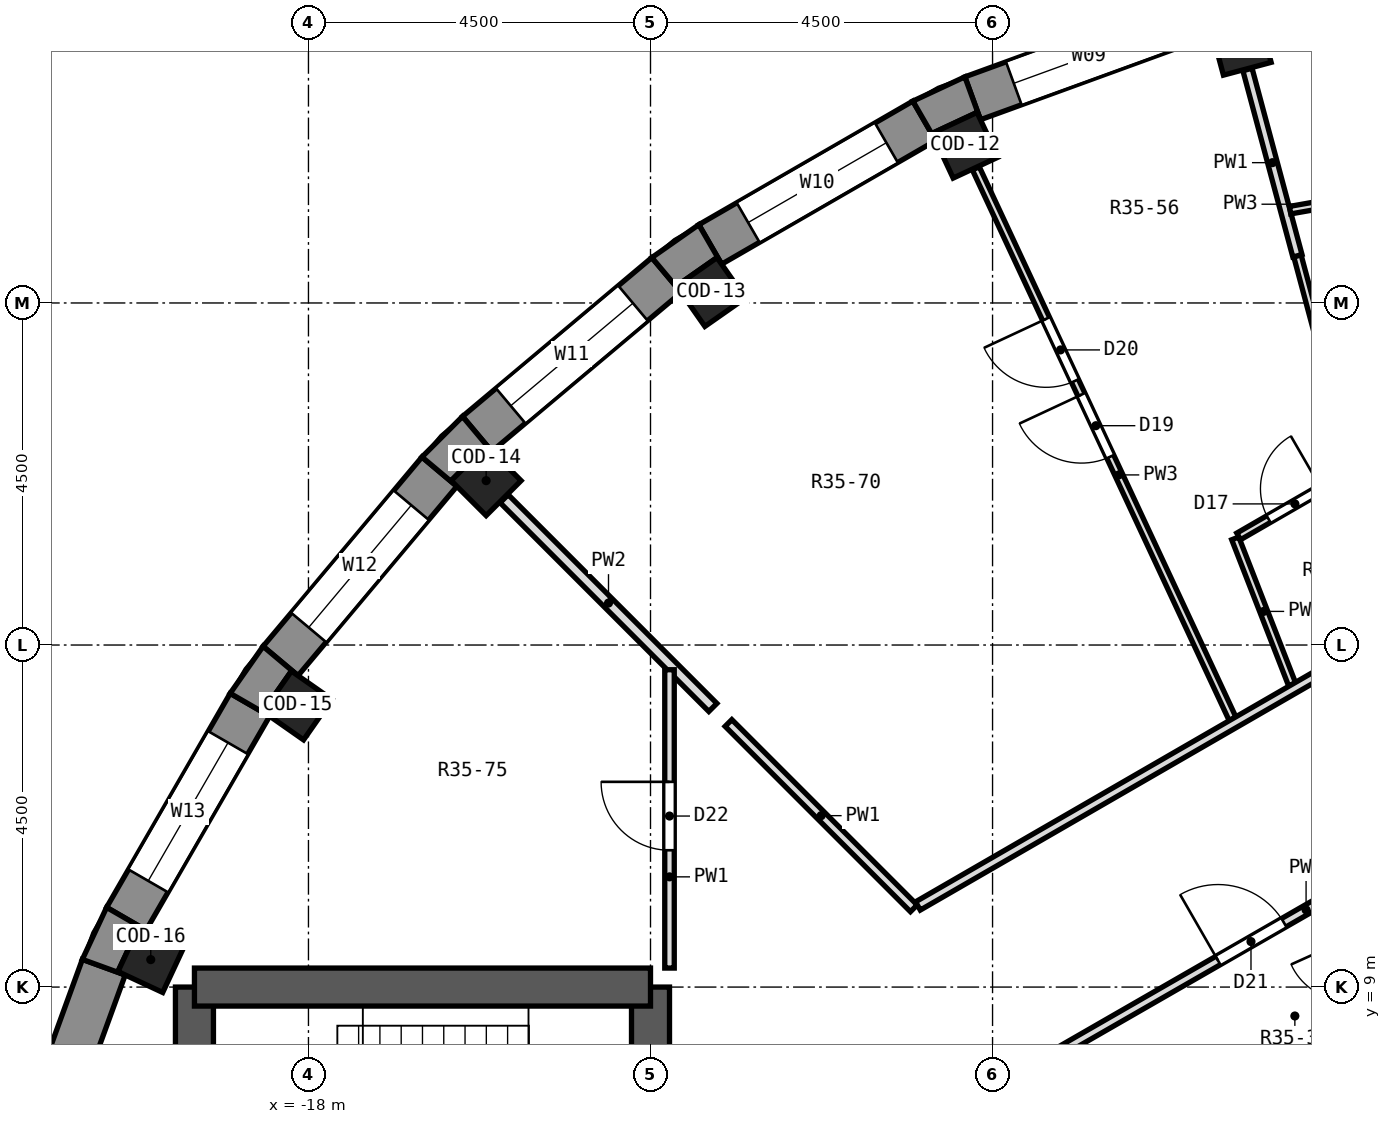
"""IFC4 building model, lengths in metres.
Left out: names, types, materials, properties, quantities, classifications, styles, units other than length and angle.
Written with IfcOpenShell. Run it as: python <this file> out.ifc"""

import sys

from ifc_helpers import new_model, si_unit, direction, frame, frame_2d, origin, origin_2d, place, context, subcontext, project, spatial, polyline, rectangle, outline, extrude, element, fill, save


model = new_model("IFC4")
c1 = context("Model", 3, precision=1e-05, world=origin(), true_north=direction((0.0, 1.0)))
c2 = subcontext(c1, "Body", "Model", "MODEL_VIEW")
j1 = project(units=[si_unit("LENGTHUNIT", "METRE"), si_unit("PLANEANGLEUNIT", "RADIAN")], contexts=[c1])
p1 = place(None, origin())
s1 = spatial("IfcSite", under=j1, at=p1, CompositionType="ELEMENT")
p2 = place(p1, origin())
s2 = spatial("IfcBuilding", under=s1, at=p2, CompositionType="ELEMENT")
p3 = place(p2, frame((0.0, 0.0, 249.5)))
s3 = spatial("IfcBuildingStorey", under=s2, at=p3, CompositionType="ELEMENT", Elevation=249.5)
for number, where, z_axis, x_axis in (
    (1, (-5.733, 21.395, 0.0), (0.0, 0.0, 1.0), (-0.259, 0.966, 0.0)),
    (2, (-9.361, 20.075, 0.0), (0.0, 0.0, 1.0), (-0.423, 0.906, 0.0)),
    (3, (-12.705, 18.144, 0.0), (0.0, 0.0, 1.0), (-0.574, 0.819, 0.0)),
    (4, (-15.662, 15.662, 0.0), (0.0, 0.0, 1.0), (-0.707, 0.707, 0.0)),
    (5, (-18.144, 12.705, 0.0), (0.0, 0.0, 1.0), (-0.819, 0.574, 0.0)),
    (6, (-20.075, 9.361, 0.0), (0.0, 0.0, 1.0), (-0.906, 0.423, 0.0)),
):
    element("IfcColumn", number, at=place(p3, frame(where, z_axis=z_axis, x_axis=x_axis)), inside=s3, PredefinedType="COLUMN", context=c2, shape_type="SweptSolid", body=[
        extrude(rectangle(XDim=0.65, YDim=0.65, at=origin_2d()), origin(), (0.0, 0.0, 1.0), 3.3),
    ])
p4 = place(p3, frame((-13.5, -9.0, 0.0), z_axis=(0.0, 0.0, 1.0), x_axis=(0.0, 1.0, 0.0)))
e7 = element("IfcWall", 7, at=p4, inside=s3, PredefinedType="SHEAR", context=c2, shape_type="SweptSolid", body=[
    extrude(rectangle(XDim=18.0, YDim=0.5, at=frame_2d((9.0, 0.0))), origin(), (0.0, 0.0, 1.0), 3.3),
])
p5 = place(p4, frame((15.4, 0.0, 0.0)))
e8 = element("IfcOpeningElement", 8, at=p5, cuts=e7, PredefinedType="OPENING", context=c2, shape_type="SweptSolid", body=[
    extrude(rectangle(XDim=1.2, YDim=2.1, at=frame_2d((0.6, 1.05))), frame((0.0, 0.262, 0.0), z_axis=(0.0, -1.0, 0.0), x_axis=(1.0, 0.0, 0.0)), (0.0, 0.0, 1.0), 0.524),
])
p6 = place(p4, frame((1.4, 0.0, 0.0)))
e9 = element("IfcOpeningElement", 9, at=p6, cuts=e7, PredefinedType="OPENING", context=c2, shape_type="SweptSolid", body=[
    extrude(rectangle(XDim=1.2, YDim=2.1, at=frame_2d((0.6, 1.05))), frame((0.0, 0.262, 0.0), z_axis=(0.0, -1.0, 0.0), x_axis=(1.0, 0.0, 0.0)), (0.0, 0.0, 1.0), 0.524),
])
p7 = place(p4, frame((7.5, 0.0, 0.0)))
e10 = element("IfcOpeningElement", 10, at=p7, cuts=e7, PredefinedType="OPENING", context=c2, shape_type="SweptSolid", body=[
    extrude(rectangle(XDim=3.0, YDim=2.4, at=frame_2d((1.5, 1.2))), frame((0.0, 0.262, 0.0), z_axis=(0.0, -1.0, 0.0), x_axis=(1.0, 0.0, 0.0)), (0.0, 0.0, 1.0), 0.524),
])
p8 = place(p3, frame((-19.5, -9.0, 0.0), z_axis=(0.0, 0.0, 1.0), x_axis=(0.0, 1.0, 0.0)))
e11 = element("IfcWall", 11, at=p8, inside=s3, PredefinedType="SHEAR", context=c2, shape_type="SweptSolid", body=[
    extrude(rectangle(XDim=18.0, YDim=0.5, at=frame_2d((9.0, 0.0))), origin(), (0.0, 0.0, 1.0), 3.3),
])
p9 = place(p8, frame((9.45, 0.0, 0.0)))
e12 = element("IfcOpeningElement", 12, at=p9, cuts=e11, PredefinedType="OPENING", context=c2, shape_type="SweptSolid", body=[
    extrude(rectangle(XDim=0.9, YDim=2.1, at=frame_2d((0.45, 1.05))), frame((0.0, 0.262, 0.0), z_axis=(0.0, -1.0, 0.0), x_axis=(1.0, 0.0, 0.0)), (0.0, 0.0, 1.0), 0.524),
])
p10 = place(p8, frame((7.65, 0.0, 0.0)))
e13 = element("IfcOpeningElement", 13, at=p10, cuts=e11, PredefinedType="OPENING", context=c2, shape_type="SweptSolid", body=[
    extrude(rectangle(XDim=0.9, YDim=2.1, at=frame_2d((0.45, 1.05))), frame((0.0, 0.262, 0.0), z_axis=(0.0, -1.0, 0.0), x_axis=(1.0, 0.0, 0.0)), (0.0, 0.0, 1.0), 0.524),
])
p11 = place(p3, frame((-13.5, 9.0, 0.0), z_axis=(0.0, 0.0, 1.0), x_axis=(-1.0, 0.0, 0.0)))
e14 = element("IfcWall", 14, at=p11, inside=s3, PredefinedType="SHEAR", context=c2, shape_type="SweptSolid", body=[
    extrude(rectangle(XDim=6.0, YDim=0.5, at=frame_2d((3.0, 0.0))), origin(), (0.0, 0.0, 1.0), 3.3),
])
p12 = place(p3, frame((-6.206, 21.805, 0.0), z_axis=(0.0, 0.0, 1.0), x_axis=(-0.939679383794, -0.342056509473, 0.0)))
e15 = element("IfcWall", 15, at=p12, inside=s3, PredefinedType="SOLIDWALL", context=c2, shape_type="SweptSolid", body=[
    extrude(rectangle(XDim=3.252, YDim=0.6, at=frame_2d((1.626, 0.0))), origin(), (0.0, 0.0, 1.0), 2.9),
])
p13 = place(p12, frame((0.576, 0.0, 0.9)))
e16 = element("IfcOpeningElement", 16, at=p13, cuts=e15, PredefinedType="OPENING", context=c2, shape_type="SweptSolid", body=[
    extrude(rectangle(XDim=2.1, YDim=1.8, at=frame_2d((1.05, 0.9))), frame((0.0, 0.312, 0.0), z_axis=(0.0, -1.0, 0.0), x_axis=(1.0, 0.0, 0.0)), (0.0, 0.0, 1.0), 0.624),
])
p14 = place(p3, frame((-9.898, 20.396, 0.0), z_axis=(0.0, 0.0, 1.0), x_axis=(-0.866016800201, -0.500014901547, 0.0)))
e17 = element("IfcWall", 17, at=p14, inside=s3, PredefinedType="SOLIDWALL", context=c2, shape_type="SweptSolid", body=[
    extrude(rectangle(XDim=3.252, YDim=0.6, at=frame_2d((1.626, 0.0))), origin(), (0.0, 0.0, 1.0), 2.9),
])
p15 = place(p14, frame((0.576, 0.0, 0.9)))
e18 = element("IfcOpeningElement", 18, at=p15, cuts=e17, PredefinedType="OPENING", context=c2, shape_type="SweptSolid", body=[
    extrude(rectangle(XDim=2.1, YDim=1.8, at=frame_2d((1.05, 0.9))), frame((0.0, 0.312, 0.0), z_axis=(0.0, -1.0, 0.0), x_axis=(1.0, 0.0, 0.0)), (0.0, 0.0, 1.0), 0.624),
])
p16 = place(p3, frame((-13.29, 18.367, 0.0), z_axis=(0.0, 0.0, 1.0), x_axis=(-0.766056773982, -0.64277291405, 0.0)))
e19 = element("IfcWall", 19, at=p16, inside=s3, PredefinedType="SOLIDWALL", context=c2, shape_type="SweptSolid", body=[
    extrude(rectangle(XDim=3.252, YDim=0.6, at=frame_2d((1.626, 0.0))), origin(), (0.0, 0.0, 1.0), 2.9),
])
p17 = place(p16, frame((0.576, 0.0, 0.9)))
e20 = element("IfcOpeningElement", 20, at=p17, cuts=e19, PredefinedType="OPENING", context=c2, shape_type="SweptSolid", body=[
    extrude(rectangle(XDim=2.1, YDim=1.8, at=frame_2d((1.05, 0.9))), frame((0.0, 0.312, 0.0), z_axis=(0.0, -1.0, 0.0), x_axis=(1.0, 0.0, 0.0)), (0.0, 0.0, 1.0), 0.624),
])
p18 = place(p3, frame((-16.277, 15.781, 0.0), z_axis=(0.0, 0.0, 1.0), x_axis=(-0.64277291405, -0.766056773982, 0.0)))
e21 = element("IfcWall", 21, at=p18, inside=s3, PredefinedType="SOLIDWALL", context=c2, shape_type="SweptSolid", body=[
    extrude(rectangle(XDim=3.252, YDim=0.6, at=frame_2d((1.626, 0.0))), origin(), (0.0, 0.0, 1.0), 2.9),
])
p19 = place(p18, frame((0.576, 0.0, 0.9)))
e22 = element("IfcOpeningElement", 22, at=p19, cuts=e21, PredefinedType="OPENING", context=c2, shape_type="SweptSolid", body=[
    extrude(rectangle(XDim=2.1, YDim=1.8, at=frame_2d((1.05, 0.9))), frame((0.0, 0.312, 0.0), z_axis=(0.0, -1.0, 0.0), x_axis=(1.0, 0.0, 0.0)), (0.0, 0.0, 1.0), 0.624),
])
p20 = place(p3, frame((-18.77, 12.714, 0.0), z_axis=(0.0, 0.0, 1.0), x_axis=(-0.500014901547, -0.866016800201, 0.0)))
e23 = element("IfcWall", 23, at=p20, inside=s3, PredefinedType="SOLIDWALL", context=c2, shape_type="SweptSolid", body=[
    extrude(rectangle(XDim=3.252, YDim=0.6, at=frame_2d((1.626, 0.0))), origin(), (0.0, 0.0, 1.0), 2.9),
])
p21 = place(p20, frame((0.576, 0.0, 0.9)))
e24 = element("IfcOpeningElement", 24, at=p21, cuts=e23, PredefinedType="OPENING", context=c2, shape_type="SweptSolid", body=[
    extrude(rectangle(XDim=2.1, YDim=1.8, at=frame_2d((1.05, 0.9))), frame((0.0, 0.312, 0.0), z_axis=(0.0, -1.0, 0.0), x_axis=(1.0, 0.0, 0.0)), (0.0, 0.0, 1.0), 0.624),
])
p22 = place(p3, frame((-20.693, 9.262, 0.0), z_axis=(0.0, 0.0, 1.0), x_axis=(-0.342056509473, -0.939679383794, 0.0)))
e25 = element("IfcWall", 25, at=p22, inside=s3, PredefinedType="SOLIDWALL", context=c2, shape_type="SweptSolid", body=[
    extrude(rectangle(XDim=3.252, YDim=0.6, at=frame_2d((1.626, 0.0))), origin(), (0.0, 0.0, 1.0), 2.9),
])
p23 = place(p3, origin())
e26 = element("IfcWall", 26, at=p23, inside=s3, PredefinedType="SOLIDWALL", context=c2, shape_type="SweptSolid", body=[
    extrude(outline(polyline([(-9.364, 20.975), (-10.048, 20.656), (-9.748, 20.136), (-9.793, 20.232), (-9.204, 20.507), (-9.159, 20.411), (-9.364, 20.975)])), origin(), (0.0, 0.0, 1.0), 2.9),
])
p24 = place(p3, origin())
e27 = element("IfcWall", 27, at=p24, inside=s3, PredefinedType="SOLIDWALL", context=c2, shape_type="SweptSolid", body=[
    extrude(outline(polyline([(-12.864, 19.03), (-13.482, 18.597), (-13.097, 18.137), (-13.157, 18.224), (-12.625, 18.597), (-12.564, 18.51), (-12.864, 19.03)])), origin(), (0.0, 0.0, 1.0), 2.9),
])
p25 = place(p3, origin())
e28 = element("IfcWall", 28, at=p25, inside=s3, PredefinedType="SOLIDWALL", context=c2, shape_type="SweptSolid", body=[
    extrude(outline(polyline([(-16.507, 15.973), (-16.047, 15.588), (-16.122, 15.662), (-15.662, 16.122), (-15.588, 16.047), (-15.973, 16.507), (-16.507, 15.973)])), origin(), (0.0, 0.0, 1.0), 2.9),
])
p26 = place(p3, origin())
e29 = element("IfcWall", 29, at=p26, inside=s3, PredefinedType="SOLIDWALL", context=c2, shape_type="SweptSolid", body=[
    extrude(outline(polyline([(-19.03, 12.864), (-18.51, 12.564), (-18.597, 12.625), (-18.224, 13.157), (-18.137, 13.097), (-18.597, 13.482), (-19.03, 12.864)])), origin(), (0.0, 0.0, 1.0), 2.9),
])
p27 = place(p3, origin())
e30 = element("IfcWall", 30, at=p27, inside=s3, PredefinedType="SOLIDWALL", context=c2, shape_type="SweptSolid", body=[
    extrude(outline(polyline([(-20.656, 10.048), (-20.975, 9.364), (-20.411, 9.159), (-20.507, 9.204), (-20.232, 9.793), (-20.136, 9.748), (-20.656, 10.048)])), origin(), (0.0, 0.0, 1.0), 2.9),
])
p28 = place(p3, frame((-2.393, 8.203, 0.0), z_axis=(0.0, 0.0, 1.0), x_axis=(-0.866028316509, -0.499994954979, 0.0)))
e31 = element("IfcWall", 31, at=p28, inside=s3, PredefinedType="SOLIDWALL", context=c2, shape_type="SweptSolid", body=[
    extrude(rectangle(XDim=4.059, YDim=0.6, at=frame_2d((2.029, 0.0))), origin(), (0.0, 0.0, 1.0), 2.9),
])
p29 = place(p28, frame((0.829, 0.0, 0.9)))
e32 = element("IfcOpeningElement", 32, at=p29, cuts=e31, PredefinedType="OPENING", context=c2, shape_type="SweptSolid", body=[
    extrude(rectangle(XDim=2.4, YDim=1.8, at=frame_2d((1.2, 0.9))), frame((0.0, 0.312, 0.0), z_axis=(0.0, -1.0, 0.0), x_axis=(1.0, 0.0, 0.0)), (0.0, 0.0, 1.0), 0.624),
])
p30 = place(p3, frame((-4.989, 18.621, 0.0), z_axis=(0.0, 0.0, 1.0), x_axis=(0.258601958208, -0.965983968403, 0.0)))
e33 = element("IfcWall", 33, at=p30, inside=s3, PredefinedType="PARTITIONING", context=c2, shape_type="SweptSolid", body=[
    extrude(rectangle(XDim=1.698, YDim=0.1, at=frame_2d((0.849, 0.0))), origin(), (0.0, 0.0, 1.0), 2.9),
])
p31 = place(p3, frame((-5.646, 21.072, 0.0), z_axis=(0.0, 0.0, 1.0), x_axis=(0.258914025253, -0.965900371429, 0.0)))
e34 = element("IfcWall", 34, at=p31, inside=s3, PredefinedType="PARTITIONING", context=c2, shape_type="SweptSolid", body=[
    extrude(rectangle(XDim=2.537, YDim=0.125, at=frame_2d((1.269, 0.0))), origin(), (0.0, 0.0, 1.0), 2.9),
])
p32 = place(p3, frame((-5.807, 14.903, 0.0), z_axis=(0.0, 0.0, 1.0), x_axis=(0.362800505058, -0.931866832509, 0.0)))
e35 = element("IfcWall", 35, at=p32, inside=s3, PredefinedType="PARTITIONING", context=c2, shape_type="SweptSolid", body=[
    extrude(rectangle(XDim=2.062, YDim=0.1, at=frame_2d((1.031, 0.0))), origin(), (0.0, 0.0, 1.0), 2.9),
])
p33 = place(p3, frame((-9.22, 19.771, 0.0), z_axis=(0.0, 0.0, 1.0), x_axis=(0.422639558445, -0.906297855916, 0.0)))
e36 = element("IfcWall", 36, at=p33, inside=s3, PredefinedType="PARTITIONING", context=c2, shape_type="SweptSolid", body=[
    extrude(rectangle(XDim=7.99, YDim=0.1, at=frame_2d((3.995, 0.0))), origin(), (0.0, 0.0, 1.0), 2.9),
])
p34 = place(p33, frame((3.285, 0.0, 0.0)))
e37 = element("IfcOpeningElement", 37, at=p34, cuts=e36, PredefinedType="OPENING", context=c2, shape_type="SweptSolid", body=[
    extrude(rectangle(XDim=0.9, YDim=2.1, at=frame_2d((0.45, 1.05))), frame((0.0, 0.062, 0.0), z_axis=(0.0, -1.0, 0.0), x_axis=(1.0, 0.0, 0.0)), (0.0, 0.0, 1.0), 0.124),
])
p35 = place(p33, frame((2.186, 0.0, 0.0)))
e38 = element("IfcOpeningElement", 38, at=p35, cuts=e36, PredefinedType="OPENING", context=c2, shape_type="SweptSolid", body=[
    extrude(rectangle(XDim=0.9, YDim=2.1, at=frame_2d((0.45, 1.05))), frame((0.0, 0.062, 0.0), z_axis=(0.0, -1.0, 0.0), x_axis=(1.0, 0.0, 0.0)), (0.0, 0.0, 1.0), 0.124),
])
p36 = place(p3, frame((-12.474, 12.474, 0.0), z_axis=(0.0, 0.0, 1.0), x_axis=(0.707106781187, -0.707106781187, 0.0)))
e39 = element("IfcWall", 39, at=p36, inside=s3, PredefinedType="PARTITIONING", context=c2, shape_type="SweptSolid", body=[
    extrude(rectangle(XDim=3.448, YDim=0.125, at=frame_2d((1.724, 0.0))), origin(), (0.0, 0.0, 1.0), 2.9),
])
p37 = place(p3, frame((-15.426, 15.426, 0.0), z_axis=(0.0, 0.0, 1.0), x_axis=(0.706981050965, -0.707232489056, 0.0)))
e40 = element("IfcWall", 40, at=p37, inside=s3, PredefinedType="PARTITIONING", context=c2, shape_type="SweptSolid", body=[
    extrude(rectangle(XDim=3.884, YDim=0.15, at=frame_2d((1.942, 0.0))), origin(), (0.0, 0.0, 1.0), 2.9),
])
p38 = place(p3, frame((-5.085, 19.221, 0.0), z_axis=(0.0, 0.0, 1.0), x_axis=(0.984739131799, 0.174036899257, 0.0)))
e41 = element("IfcWall", 41, at=p38, inside=s3, PredefinedType="PARTITIONING", context=c2, shape_type="SweptSolid", body=[
    extrude(rectangle(XDim=2.381, YDim=0.1, at=frame_2d((1.19, 0.0))), origin(), (0.0, 0.0, 1.0), 2.9),
])
p39 = place(p38, frame((0.784, 0.0, 0.0)))
e42 = element("IfcOpeningElement", 42, at=p39, cuts=e41, PredefinedType="OPENING", context=c2, shape_type="SweptSolid", body=[
    extrude(rectangle(XDim=0.8, YDim=2.1, at=frame_2d((0.4, 1.05))), frame((0.0, 0.062, 0.0), z_axis=(0.0, -1.0, 0.0), x_axis=(1.0, 0.0, 0.0)), (0.0, 0.0, 1.0), 0.124),
])
p40 = place(p3, frame((-8.083, 8.171, 0.0), z_axis=(0.0, 0.0, 1.0), x_axis=(0.866868209522, 0.498537368027, 0.0)))
e43 = element("IfcWall", 43, at=p40, inside=s3, PredefinedType="PARTITIONING", context=c2, shape_type="SweptSolid", body=[
    extrude(rectangle(XDim=5.816, YDim=0.125, at=frame_2d((2.908, 0.0))), origin(), (0.0, 0.0, 1.0), 2.9),
])
p41 = place(p40, frame((2.364, 0.0, 0.0)))
e44 = element("IfcOpeningElement", 44, at=p41, cuts=e43, PredefinedType="OPENING", context=c2, shape_type="SweptSolid", body=[
    extrude(rectangle(XDim=1.0, YDim=2.1, at=frame_2d((0.5, 1.05))), frame((0.0, 0.074, 0.0), z_axis=(0.0, -1.0, 0.0), x_axis=(1.0, 0.0, 0.0)), (0.0, 0.0, 1.0), 0.149),
])
p42 = place(p3, frame((-9.982, 10.067, 0.0), z_axis=(0.0, 0.0, 1.0), x_axis=(0.865972766561, 0.500091159265, 0.0)))
e45 = element("IfcWall", 45, at=p42, inside=s3, PredefinedType="PARTITIONING", context=c2, shape_type="SweptSolid", body=[
    extrude(rectangle(XDim=7.222, YDim=0.125, at=frame_2d((3.611, 0.0))), origin(), (0.0, 0.0, 1.0), 2.9),
])
p43 = place(p3, frame((-5.762, 14.929, 0.0), z_axis=(0.0, 0.0, 1.0), x_axis=(0.865924135104, 0.500175361493, 0.0)))
e46 = element("IfcWall", 46, at=p43, inside=s3, PredefinedType="PARTITIONING", context=c2, shape_type="SweptSolid", body=[
    extrude(rectangle(XDim=1.711, YDim=0.1, at=frame_2d((0.855, 0.0))), origin(), (0.0, 0.0, 1.0), 2.9),
])
p44 = place(p43, frame((0.454, 0.0, 0.0)))
e47 = element("IfcOpeningElement", 47, at=p44, cuts=e46, PredefinedType="OPENING", context=c2, shape_type="SweptSolid", body=[
    extrude(rectangle(XDim=0.8, YDim=2.1, at=frame_2d((0.4, 1.05))), frame((0.0, 0.062, 0.0), z_axis=(0.0, -1.0, 0.0), x_axis=(1.0, 0.0, 0.0)), (0.0, 0.0, 1.0), 0.124),
])
p45 = place(p3, frame((-13.25, 9.25, 0.0), z_axis=(0.0, 0.0, 1.0), x_axis=(0.0, 1.0, 0.0)))
e48 = element("IfcWall", 48, at=p45, inside=s3, PredefinedType="PARTITIONING", context=c2, shape_type="SweptSolid", body=[
    extrude(rectangle(XDim=3.925, YDim=0.125, at=frame_2d((1.962, 0.0))), origin(), (0.0, 0.0, 1.0), 2.9),
])
p46 = place(p45, frame((1.55, 0.0, 0.0)))
e49 = element("IfcOpeningElement", 49, at=p46, cuts=e48, PredefinedType="OPENING", context=c2, shape_type="SweptSolid", body=[
    extrude(rectangle(XDim=0.9, YDim=2.1, at=frame_2d((0.45, 1.05))), frame((0.0, 0.074, 0.0), z_axis=(0.0, -1.0, 0.0), x_axis=(1.0, 0.0, 0.0)), (0.0, 0.0, 1.0), 0.149),
])
p47 = place(p13, origin())
e50 = element("IfcWindow", 50, at=p47, inside=s3, PartitioningType="SINGLE_PANEL", PredefinedType="WINDOW", context=c2, shape_type="SweptSolid", body=[
    extrude(rectangle(XDim=2.1, YDim=1.8, at=frame_2d((1.05, 0.9))), frame((0.0, 0.18, 0.0), z_axis=(0.0, -1.0, 0.0), x_axis=(1.0, 0.0, 0.0)), (0.0, 0.0, 1.0), 0.06),
])
fill(e16, e50)
p48 = place(p15, origin())
e51 = element("IfcWindow", 51, at=p48, inside=s3, PartitioningType="SINGLE_PANEL", PredefinedType="WINDOW", context=c2, shape_type="SweptSolid", body=[
    extrude(rectangle(XDim=2.1, YDim=1.8, at=frame_2d((1.05, 0.9))), frame((0.0, 0.18, 0.0), z_axis=(0.0, -1.0, 0.0), x_axis=(1.0, 0.0, 0.0)), (0.0, 0.0, 1.0), 0.06),
])
fill(e18, e51)
p49 = place(p17, origin())
e52 = element("IfcWindow", 52, at=p49, inside=s3, PartitioningType="SINGLE_PANEL", PredefinedType="WINDOW", context=c2, shape_type="SweptSolid", body=[
    extrude(rectangle(XDim=2.1, YDim=1.8, at=frame_2d((1.05, 0.9))), frame((0.0, 0.18, 0.0), z_axis=(0.0, -1.0, 0.0), x_axis=(1.0, 0.0, 0.0)), (0.0, 0.0, 1.0), 0.06),
])
fill(e20, e52)
p50 = place(p19, origin())
e53 = element("IfcWindow", 53, at=p50, inside=s3, PartitioningType="SINGLE_PANEL", PredefinedType="WINDOW", context=c2, shape_type="SweptSolid", body=[
    extrude(rectangle(XDim=2.1, YDim=1.8, at=frame_2d((1.05, 0.9))), frame((0.0, 0.18, 0.0), z_axis=(0.0, -1.0, 0.0), x_axis=(1.0, 0.0, 0.0)), (0.0, 0.0, 1.0), 0.06),
])
fill(e22, e53)
p51 = place(p21, origin())
e54 = element("IfcWindow", 54, at=p51, inside=s3, PartitioningType="SINGLE_PANEL", PredefinedType="WINDOW", context=c2, shape_type="SweptSolid", body=[
    extrude(rectangle(XDim=2.1, YDim=1.8, at=frame_2d((1.05, 0.9))), frame((0.0, 0.18, 0.0), z_axis=(0.0, -1.0, 0.0), x_axis=(1.0, 0.0, 0.0)), (0.0, 0.0, 1.0), 0.06),
])
fill(e24, e54)
p52 = place(p44, origin())
e55 = element("IfcDoor", 55, at=p52, inside=s3, OperationType="SINGLE_SWING_RIGHT", PredefinedType="DOOR", context=c2, shape_type="SweptSolid", body=[
    extrude(rectangle(XDim=0.8, YDim=2.1, at=frame_2d((0.4, 1.05))), frame((0.0, 0.025, 0.0), z_axis=(0.0, -1.0, 0.0), x_axis=(1.0, 0.0, 0.0)), (0.0, 0.0, 1.0), 0.05),
])
fill(e47, e55)
p53 = place(p34, frame((0.9, 0.0, 0.0), z_axis=(0.0, 0.0, 1.0), x_axis=(-1.0, 0.0, 0.0)))
e56 = element("IfcDoor", 56, at=p53, inside=s3, OperationType="SINGLE_SWING_RIGHT", PredefinedType="DOOR", context=c2, shape_type="SweptSolid", body=[
    extrude(rectangle(XDim=0.9, YDim=2.1, at=frame_2d((0.45, 1.05))), frame((0.0, 0.025, 0.0), z_axis=(0.0, -1.0, 0.0), x_axis=(1.0, 0.0, 0.0)), (0.0, 0.0, 1.0), 0.05),
])
fill(e37, e56)
p54 = place(p35, frame((0.9, 0.0, 0.0), z_axis=(0.0, 0.0, 1.0), x_axis=(-1.0, 0.0, 0.0)))
e57 = element("IfcDoor", 57, at=p54, inside=s3, OperationType="SINGLE_SWING_RIGHT", PredefinedType="DOOR", context=c2, shape_type="SweptSolid", body=[
    extrude(rectangle(XDim=0.9, YDim=2.1, at=frame_2d((0.45, 1.05))), frame((0.0, 0.025, 0.0), z_axis=(0.0, -1.0, 0.0), x_axis=(1.0, 0.0, 0.0)), (0.0, 0.0, 1.0), 0.05),
])
fill(e38, e57)
p55 = place(p41, origin())
e58 = element("IfcDoor", 58, at=p55, inside=s3, OperationType="SINGLE_SWING_LEFT", PredefinedType="DOOR", context=c2, shape_type="SweptSolid", body=[
    extrude(rectangle(XDim=1.0, YDim=2.1, at=frame_2d((0.5, 1.05))), frame((0.0, 0.025, 0.0), z_axis=(0.0, -1.0, 0.0), x_axis=(1.0, 0.0, 0.0)), (0.0, 0.0, 1.0), 0.05),
])
fill(e44, e58)
p56 = place(p46, origin())
e59 = element("IfcDoor", 59, at=p56, inside=s3, OperationType="SINGLE_SWING_RIGHT", PredefinedType="DOOR", context=c2, shape_type="SweptSolid", body=[
    extrude(rectangle(XDim=0.9, YDim=2.1, at=frame_2d((0.45, 1.05))), frame((0.0, 0.025, 0.0), z_axis=(0.0, -1.0, 0.0), x_axis=(1.0, 0.0, 0.0)), (0.0, 0.0, 1.0), 0.05),
])
fill(e49, e59)
save(model, sys.argv[1])
